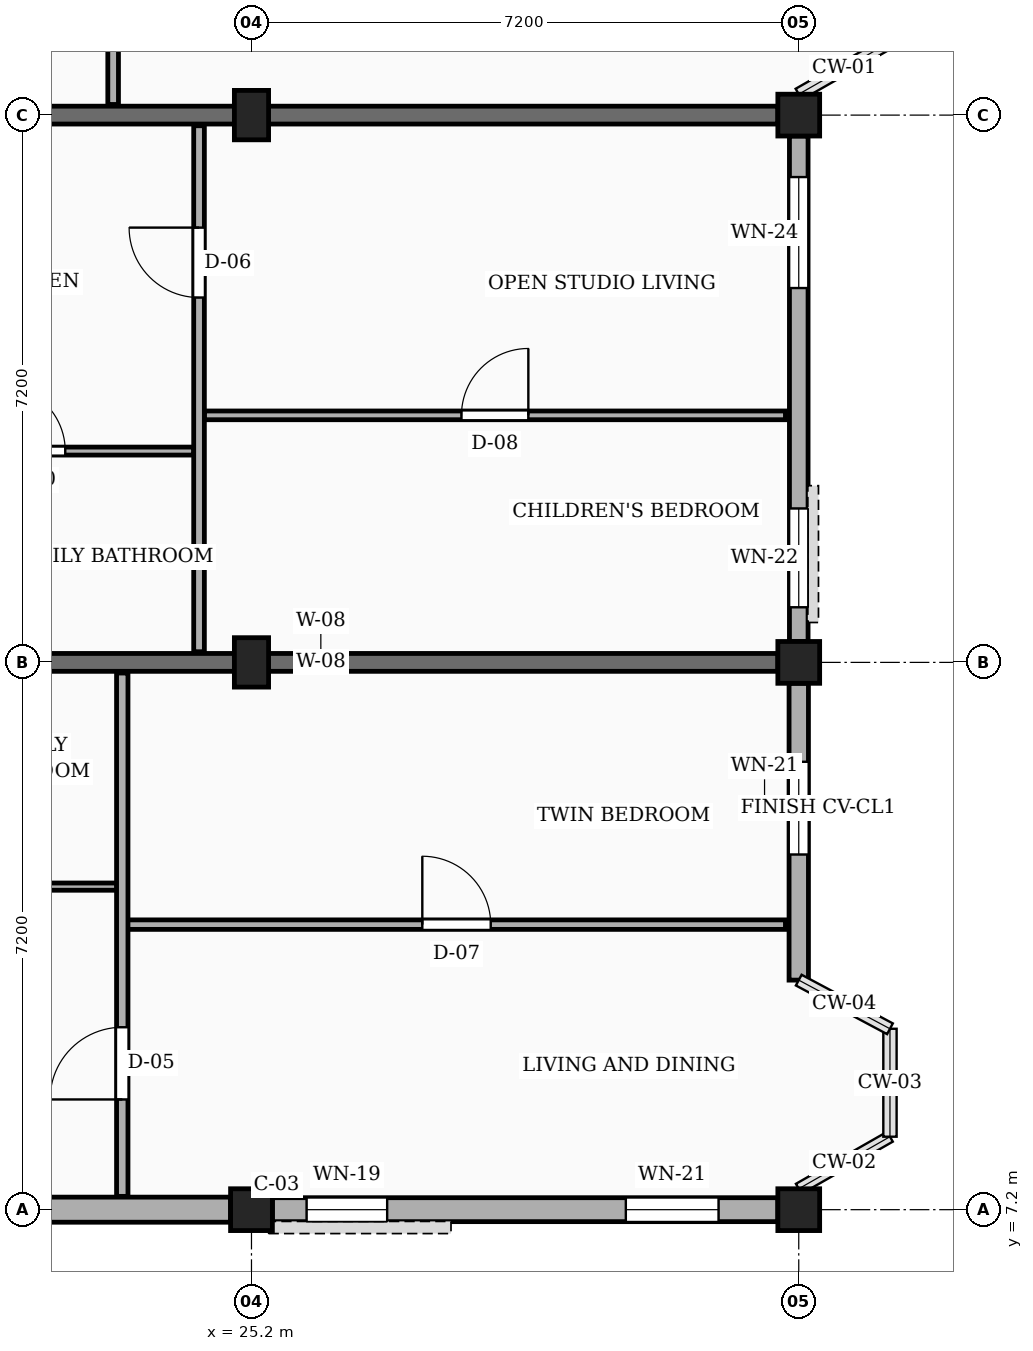
"""IFC4 building model, lengths in metres.
Left out: names, types, materials, properties, quantities, classifications, styles, units other than length and angle.
Written with IfcOpenShell. Run it as: python <this file> out.ifc"""

import sys

from ifc_helpers import new_model, si_unit, direction, frame, frame_2d, origin, origin_2d, place, context, subcontext, project, spatial, rectangle, extrude, element, fill, save


model = new_model("IFC4")
c1 = context("Model", 3, precision=1e-05, world=origin(), true_north=direction((0.0, 1.0)))
c2 = subcontext(c1, "Body", "Model", "MODEL_VIEW")
j1 = project(units=[si_unit("LENGTHUNIT", "METRE"), si_unit("PLANEANGLEUNIT", "RADIAN")], contexts=[c1])
p1 = place(None, origin())
s1 = spatial("IfcSite", under=j1, at=p1, CompositionType="ELEMENT")
p2 = place(p1, origin())
s2 = spatial("IfcBuilding", under=s1, at=p2, CompositionType="ELEMENT")
p3 = place(p2, frame((0.0, 0.0, 17.1)))
s3 = spatial("IfcBuildingStorey", under=s2, at=p3, CompositionType="ELEMENT", Elevation=17.1)
p4 = place(p3, frame((25.2, 7.2, 0.0), z_axis=(0.0, 0.0, 1.0), x_axis=(1.0, 0.0, 0.0)))
e1 = element("IfcColumn", 1, at=p4, inside=s3, PredefinedType="COLUMN", context=c2, shape_type="SweptSolid", body=[
    extrude(rectangle(XDim=0.55, YDim=0.55, at=origin_2d()), origin(), (0.0, 0.0, 1.0), 3.15),
])
for number, where, z_axis, x_axis in (
    (2, (25.2, 14.4, 0.0), (0.0, 0.0, 1.0), (1.0, 0.0, 0.0)),
    (3, (25.2, 21.6, 0.0), (0.0, 0.0, 1.0), (1.0, 0.0, 0.0)),
):
    element("IfcColumn", number, at=place(p3, frame(where, z_axis=z_axis, x_axis=x_axis)), inside=s3, PredefinedType="COLUMN", context=c2, shape_type="SweptSolid", body=[
        extrude(rectangle(XDim=0.45, YDim=0.65, at=origin_2d()), origin(), (0.0, 0.0, 1.0), 3.15),
    ])
for number, where, z_axis, x_axis in (
    (4, (32.4, 7.2, 0.0), (0.0, 0.0, 1.0), (1.0, 0.0, 0.0)),
    (5, (32.4, 14.4, 0.0), (0.0, 0.0, 1.0), (1.0, 0.0, 0.0)),
    (6, (32.4, 21.6, 0.0), (0.0, 0.0, 1.0), (1.0, 0.0, 0.0)),
):
    element("IfcColumn", number, at=place(p3, frame(where, z_axis=z_axis, x_axis=x_axis)), inside=s3, PredefinedType="COLUMN", context=c2, shape_type="SweptSolid", body=[
        extrude(rectangle(XDim=0.55, YDim=0.55, at=origin_2d()), origin(), (0.0, 0.0, 1.0), 3.15),
    ])
for number, where, z_axis, x_axis in (
    (7, (20.1, 14.4, 0.0), (0.0, 0.0, 1.0), (1.0, 0.0, 0.0)),
    (8, (20.1, 21.6, 0.0), (0.0, 0.0, 1.0), (1.0, 0.0, 0.0)),
):
    element("IfcWall", number, at=place(p3, frame(where, z_axis=z_axis, x_axis=x_axis)), inside=s3, PredefinedType="SOLIDWALL", context=c2, shape_type="SweptSolid", body=[
        extrude(rectangle(XDim=12.025, YDim=0.235, at=frame_2d((6.012, 0.0))), origin(), (0.0, 0.0, 1.0), 2.17),
    ])
p5 = place(p3, frame((18.275, 7.2, 0.0), z_axis=(0.0, 0.0, 1.0), x_axis=(1.0, 0.0, 0.0)))
e9 = element("IfcWall", 9, at=p5, inside=s3, PredefinedType="SOLIDWALL", context=c2, shape_type="SweptSolid", body=[
    extrude(rectangle(XDim=6.65, YDim=0.33, at=frame_2d((3.325, 0.0))), origin(), (0.0, 0.0, 1.0), 2.44),
])
p6 = place(p5, frame((0.532, 0.0, 0.78)))
e10 = element("IfcOpeningElement", 10, at=p6, cuts=e9, PredefinedType="OPENING", context=c2, shape_type="SweptSolid", body=[
    extrude(rectangle(XDim=0.9, YDim=1.36, at=frame_2d((0.45, 0.68))), frame((0.0, 0.175, 0.0), z_axis=(0.0, -1.0, 0.0), x_axis=(1.0, 0.0, 0.0)), (0.0, 0.0, 1.0), 0.35),
])
p7 = place(p5, frame((2.995, 0.0, 0.78)))
e11 = element("IfcOpeningElement", 11, at=p7, cuts=e9, PredefinedType="OPENING", context=c2, shape_type="SweptSolid", body=[
    extrude(rectangle(XDim=1.06, YDim=1.36, at=frame_2d((0.53, 0.68))), frame((0.0, 0.175, 0.0), z_axis=(0.0, -1.0, 0.0), x_axis=(1.0, 0.0, 0.0)), (0.0, 0.0, 1.0), 0.35),
])
p8 = place(p3, frame((25.475, 7.2, 0.0), z_axis=(0.0, 0.0, 1.0), x_axis=(1.0, 0.0, 0.0)))
e12 = element("IfcWall", 12, at=p8, inside=s3, PredefinedType="SOLIDWALL", context=c2, shape_type="SweptSolid", body=[
    extrude(rectangle(XDim=6.65, YDim=0.315, at=frame_2d((3.325, 0.0))), origin(), (0.0, 0.0, 1.0), 2.44),
])
p9 = place(p8, frame((0.45, 0.0, 0.78)))
e13 = element("IfcOpeningElement", 13, at=p9, cuts=e12, PredefinedType="OPENING", context=c2, shape_type="SweptSolid", body=[
    extrude(rectangle(XDim=1.06, YDim=1.36, at=frame_2d((0.53, 0.68))), frame((0.0, 0.167, 0.0), z_axis=(0.0, -1.0, 0.0), x_axis=(1.0, 0.0, 0.0)), (0.0, 0.0, 1.0), 0.335),
])
p10 = place(p8, frame((4.65, 0.0, 0.78)))
e14 = element("IfcOpeningElement", 14, at=p10, cuts=e12, PredefinedType="OPENING", context=c2, shape_type="SweptSolid", body=[
    extrude(rectangle(XDim=1.22, YDim=1.36, at=frame_2d((0.61, 0.68))), frame((0.0, 0.167, 0.0), z_axis=(0.0, -1.0, 0.0), x_axis=(1.0, 0.0, 0.0)), (0.0, 0.0, 1.0), 0.335),
])
p11 = place(p3, frame((32.4, 10.22, 0.0), z_axis=(0.0, 0.0, 1.0), x_axis=(0.0, 1.0, 0.0)))
e15 = element("IfcWall", 15, at=p11, inside=s3, PredefinedType="SOLIDWALL", context=c2, shape_type="SweptSolid", body=[
    extrude(rectangle(XDim=3.905, YDim=0.255, at=frame_2d((1.953, 0.0))), origin(), (0.0, 0.0, 1.0), 2.44),
])
p12 = place(p11, frame((1.653, 0.0, 0.78)))
e16 = element("IfcOpeningElement", 16, at=p12, cuts=e15, PredefinedType="OPENING", context=c2, shape_type="SweptSolid", body=[
    extrude(rectangle(XDim=1.22, YDim=1.36, at=frame_2d((0.61, 0.68))), frame((0.0, 0.137, 0.0), z_axis=(0.0, -1.0, 0.0), x_axis=(1.0, 0.0, 0.0)), (0.0, 0.0, 1.0), 0.275),
])
p13 = place(p3, frame((32.4, 14.675, 0.0), z_axis=(0.0, 0.0, 1.0), x_axis=(0.0, 1.0, 0.0)))
e17 = element("IfcWall", 17, at=p13, inside=s3, PredefinedType="SOLIDWALL", context=c2, shape_type="SweptSolid", body=[
    extrude(rectangle(XDim=6.65, YDim=0.245, at=frame_2d((3.325, 0.0))), origin(), (0.0, 0.0, 1.0), 2.44),
])
p14 = place(p13, frame((0.45, 0.0, 0.78)))
e18 = element("IfcOpeningElement", 18, at=p14, cuts=e17, PredefinedType="OPENING", context=c2, shape_type="SweptSolid", body=[
    extrude(rectangle(XDim=1.3, YDim=1.36, at=frame_2d((0.65, 0.68))), frame((0.0, 0.133, 0.0), z_axis=(0.0, -1.0, 0.0), x_axis=(1.0, 0.0, 0.0)), (0.0, 0.0, 1.0), 0.265),
])
p15 = place(p13, frame((4.65, 0.0, 0.78)))
e19 = element("IfcOpeningElement", 19, at=p15, cuts=e17, PredefinedType="OPENING", context=c2, shape_type="SweptSolid", body=[
    extrude(rectangle(XDim=1.46, YDim=1.36, at=frame_2d((0.73, 0.68))), frame((0.0, 0.133, 0.0), z_axis=(0.0, -1.0, 0.0), x_axis=(1.0, 0.0, 0.0)), (0.0, 0.0, 1.0), 0.265),
])
p16 = place(p3, frame((23.57, 10.95, 0.0), z_axis=(0.0, 0.0, 1.0), x_axis=(1.0, 0.0, 0.0)))
e20 = element("IfcWall", 20, at=p16, inside=s3, PredefinedType="PARTITIONING", context=c2, shape_type="SweptSolid", body=[
    extrude(rectangle(XDim=8.655, YDim=0.125, at=frame_2d((4.328, 0.0))), origin(), (0.0, 0.0, 1.0), 2.305),
])
p17 = place(p16, frame((3.877, 0.0, 0.0)))
e21 = element("IfcOpeningElement", 21, at=p17, cuts=e20, PredefinedType="OPENING", context=c2, shape_type="SweptSolid", body=[
    extrude(rectangle(XDim=0.9, YDim=2.1, at=frame_2d((0.45, 1.05))), frame((0.0, 0.073, 0.0), z_axis=(0.0, -1.0, 0.0), x_axis=(1.0, 0.0, 0.0)), (0.0, 0.0, 1.0), 0.145),
])
p18 = place(p3, frame((20.19, 11.45, 0.0), z_axis=(0.0, 0.0, 1.0), x_axis=(1.0, 0.0, 0.0)))
e22 = element("IfcWall", 22, at=p18, inside=s3, PredefinedType="PARTITIONING", context=c2, shape_type="SweptSolid", body=[
    extrude(rectangle(XDim=3.24, YDim=0.095, at=frame_2d((1.62, 0.0))), origin(), (0.0, 0.0, 1.0), 2.305),
])
p19 = place(p18, frame((1.17, 0.0, 0.0)))
e23 = element("IfcOpeningElement", 23, at=p19, cuts=e22, PredefinedType="OPENING", context=c2, shape_type="SweptSolid", body=[
    extrude(rectangle(XDim=0.9, YDim=2.05, at=frame_2d((0.45, 1.025))), frame((0.0, 0.058, 0.0), z_axis=(0.0, -1.0, 0.0), x_axis=(1.0, 0.0, 0.0)), (0.0, 0.0, 1.0), 0.115),
])
p20 = place(p3, frame((23.5, 7.375, 0.0), z_axis=(0.0, 0.0, 1.0), x_axis=(0.0, 1.0, 0.0)))
e24 = element("IfcWall", 24, at=p20, inside=s3, PredefinedType="PARTITIONING", context=c2, shape_type="SweptSolid", body=[
    extrude(rectangle(XDim=6.885, YDim=0.15, at=frame_2d((3.442, 0.0))), origin(), (0.0, 0.0, 1.0), 2.305),
])
p21 = place(p20, frame((1.275, 0.0, 0.0)))
e25 = element("IfcOpeningElement", 25, at=p21, cuts=e24, PredefinedType="OPENING", context=c2, shape_type="SweptSolid", body=[
    extrude(rectangle(XDim=0.95, YDim=2.1, at=frame_2d((0.475, 1.05))), frame((0.0, 0.085, 0.0), z_axis=(0.0, -1.0, 0.0), x_axis=(1.0, 0.0, 0.0)), (0.0, 0.0, 1.0), 0.17),
])
p22 = place(p3, frame((24.58, 17.65, 0.0), z_axis=(0.0, 0.0, 1.0), x_axis=(1.0, 0.0, 0.0)))
e26 = element("IfcWall", 26, at=p22, inside=s3, PredefinedType="PARTITIONING", context=c2, shape_type="SweptSolid", body=[
    extrude(rectangle(XDim=7.645, YDim=0.115, at=frame_2d((3.823, 0.0))), origin(), (0.0, 0.0, 1.0), 2.305),
])
p23 = place(p22, frame((3.383, 0.0, 0.0)))
e27 = element("IfcOpeningElement", 27, at=p23, cuts=e26, PredefinedType="OPENING", context=c2, shape_type="SweptSolid", body=[
    extrude(rectangle(XDim=0.88, YDim=2.08, at=frame_2d((0.44, 1.04))), frame((0.0, 0.067, 0.0), z_axis=(0.0, -1.0, 0.0), x_axis=(1.0, 0.0, 0.0)), (0.0, 0.0, 1.0), 0.135),
])
p24 = place(p3, frame((20.19, 17.18, 0.0), z_axis=(0.0, 0.0, 1.0), x_axis=(1.0, 0.0, 0.0)))
e28 = element("IfcWall", 28, at=p24, inside=s3, PredefinedType="PARTITIONING", context=c2, shape_type="SweptSolid", body=[
    extrude(rectangle(XDim=4.25, YDim=0.105, at=frame_2d((2.125, 0.0))), origin(), (0.0, 0.0, 1.0), 2.305),
])
p25 = place(p24, frame((1.69, 0.0, 0.0)))
e29 = element("IfcOpeningElement", 29, at=p25, cuts=e28, PredefinedType="OPENING", context=c2, shape_type="SweptSolid", body=[
    extrude(rectangle(XDim=0.87, YDim=2.05, at=frame_2d((0.435, 1.025))), frame((0.0, 0.062, 0.0), z_axis=(0.0, -1.0, 0.0), x_axis=(1.0, 0.0, 0.0)), (0.0, 0.0, 1.0), 0.125),
])
p26 = place(p3, frame((24.51, 14.54, 0.0), z_axis=(0.0, 0.0, 1.0), x_axis=(0.0, 1.0, 0.0)))
e30 = element("IfcWall", 30, at=p26, inside=s3, PredefinedType="PARTITIONING", context=c2, shape_type="SweptSolid", body=[
    extrude(rectangle(XDim=6.92, YDim=0.14, at=frame_2d((3.46, 0.0))), origin(), (0.0, 0.0, 1.0), 2.305),
])
p27 = place(p26, frame((4.66, 0.0, 0.0)))
e31 = element("IfcOpeningElement", 31, at=p27, cuts=e30, PredefinedType="OPENING", context=c2, shape_type="SweptSolid", body=[
    extrude(rectangle(XDim=0.92, YDim=2.1, at=frame_2d((0.46, 1.05))), frame((0.0, 0.08, 0.0), z_axis=(0.0, -1.0, 0.0), x_axis=(1.0, 0.0, 0.0)), (0.0, 0.0, 1.0), 0.16),
])
p28 = place(p3, frame((23.38, 21.74, 0.0), z_axis=(0.0, 0.0, 1.0), x_axis=(0.0, 1.0, 0.0)))
e32 = element("IfcWall", 32, at=p28, inside=s3, PredefinedType="PARTITIONING", context=c2, shape_type="SweptSolid", body=[
    extrude(rectangle(XDim=6.92, YDim=0.14, at=frame_2d((3.46, 0.0))), origin(), (0.0, 0.0, 1.0), 2.305),
])
p29 = place(p28, frame((1.31, 0.0, 0.0)))
e33 = element("IfcOpeningElement", 33, at=p29, cuts=e32, PredefinedType="OPENING", context=c2, shape_type="SweptSolid", body=[
    extrude(rectangle(XDim=0.95, YDim=2.1, at=frame_2d((0.475, 1.05))), frame((0.0, 0.08, 0.0), z_axis=(0.0, -1.0, 0.0), x_axis=(1.0, 0.0, 0.0)), (0.0, 0.0, 1.0), 0.16),
])
p30 = place(p9, origin())
e34 = element("IfcWindow", 34, at=p30, inside=s3, PartitioningType="SINGLE_PANEL", PredefinedType="WINDOW", context=c2, shape_type="SweptSolid", body=[
    extrude(rectangle(XDim=1.06, YDim=1.36, at=frame_2d((0.53, 0.68))), frame((0.0, 0.03, 0.0), z_axis=(0.0, -1.0, 0.0), x_axis=(1.0, 0.0, 0.0)), (0.0, 0.0, 1.0), 0.06),
])
fill(e13, e34)
p31 = place(p10, origin())
e35 = element("IfcWindow", 35, at=p31, inside=s3, PartitioningType="SINGLE_PANEL", PredefinedType="WINDOW", context=c2, shape_type="SweptSolid", body=[
    extrude(rectangle(XDim=1.22, YDim=1.36, at=frame_2d((0.61, 0.68))), frame((0.0, 0.03, 0.0), z_axis=(0.0, -1.0, 0.0), x_axis=(1.0, 0.0, 0.0)), (0.0, 0.0, 1.0), 0.06),
])
fill(e14, e35)
p32 = place(p12, origin())
e36 = element("IfcWindow", 36, at=p32, inside=s3, PartitioningType="SINGLE_PANEL", PredefinedType="WINDOW", context=c2, shape_type="SweptSolid", body=[
    extrude(rectangle(XDim=1.22, YDim=1.36, at=frame_2d((0.61, 0.68))), frame((0.0, 0.03, 0.0), z_axis=(0.0, -1.0, 0.0), x_axis=(1.0, 0.0, 0.0)), (0.0, 0.0, 1.0), 0.06),
])
fill(e16, e36)
p33 = place(p14, origin())
e37 = element("IfcWindow", 37, at=p33, inside=s3, PartitioningType="SINGLE_PANEL", PredefinedType="WINDOW", context=c2, shape_type="SweptSolid", body=[
    extrude(rectangle(XDim=1.3, YDim=1.36, at=frame_2d((0.65, 0.68))), frame((0.0, 0.03, 0.0), z_axis=(0.0, -1.0, 0.0), x_axis=(1.0, 0.0, 0.0)), (0.0, 0.0, 1.0), 0.06),
])
fill(e18, e37)
p34 = place(p15, origin())
e38 = element("IfcWindow", 38, at=p34, inside=s3, PartitioningType="SINGLE_PANEL", PredefinedType="WINDOW", context=c2, shape_type="SweptSolid", body=[
    extrude(rectangle(XDim=1.46, YDim=1.36, at=frame_2d((0.73, 0.68))), frame((0.0, 0.03, 0.0), z_axis=(0.0, -1.0, 0.0), x_axis=(1.0, 0.0, 0.0)), (0.0, 0.0, 1.0), 0.06),
])
fill(e19, e38)
p35 = place(p17, origin())
e39 = element("IfcDoor", 39, at=p35, inside=s3, OperationType="SINGLE_SWING_LEFT", PredefinedType="DOOR", context=c2, shape_type="SweptSolid", body=[
    extrude(rectangle(XDim=0.9, YDim=2.1, at=frame_2d((0.45, 1.05))), frame((0.0, 0.025, 0.0), z_axis=(0.0, -1.0, 0.0), x_axis=(1.0, 0.0, 0.0)), (0.0, 0.0, 1.0), 0.05),
])
fill(e21, e39)
p36 = place(p21, origin())
e40 = element("IfcDoor", 40, at=p36, inside=s3, OperationType="SINGLE_SWING_LEFT", PredefinedType="DOOR", context=c2, shape_type="SweptSolid", body=[
    extrude(rectangle(XDim=0.95, YDim=2.1, at=frame_2d((0.475, 1.05))), frame((0.0, 0.025, 0.0), z_axis=(0.0, -1.0, 0.0), x_axis=(1.0, 0.0, 0.0)), (0.0, 0.0, 1.0), 0.05),
])
fill(e25, e40)
p37 = place(p23, origin())
e41 = element("IfcDoor", 41, at=p37, inside=s3, OperationType="SINGLE_SWING_RIGHT", PredefinedType="DOOR", context=c2, shape_type="SweptSolid", body=[
    extrude(rectangle(XDim=0.88, YDim=2.08, at=frame_2d((0.44, 1.04))), frame((0.0, 0.025, 0.0), z_axis=(0.0, -1.0, 0.0), x_axis=(1.0, 0.0, 0.0)), (0.0, 0.0, 1.0), 0.05),
])
fill(e27, e41)
p38 = place(p25, origin())
e42 = element("IfcDoor", 42, at=p38, inside=s3, OperationType="SINGLE_SWING_LEFT", PredefinedType="DOOR", context=c2, shape_type="SweptSolid", body=[
    extrude(rectangle(XDim=0.87, YDim=2.05, at=frame_2d((0.435, 1.025))), frame((0.0, 0.025, 0.0), z_axis=(0.0, -1.0, 0.0), x_axis=(1.0, 0.0, 0.0)), (0.0, 0.0, 1.0), 0.05),
])
fill(e29, e42)
p39 = place(p27, origin())
e43 = element("IfcDoor", 43, at=p39, inside=s3, OperationType="SINGLE_SWING_RIGHT", PredefinedType="DOOR", context=c2, shape_type="SweptSolid", body=[
    extrude(rectangle(XDim=0.92, YDim=2.1, at=frame_2d((0.46, 1.05))), frame((0.0, 0.025, 0.0), z_axis=(0.0, -1.0, 0.0), x_axis=(1.0, 0.0, 0.0)), (0.0, 0.0, 1.0), 0.05),
])
fill(e31, e43)
save(model, sys.argv[1])
